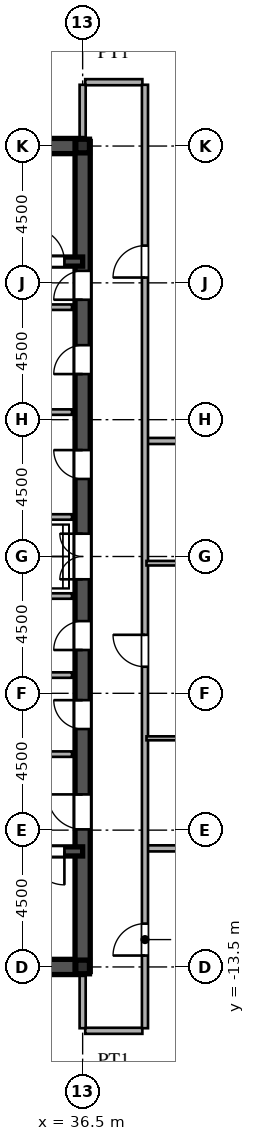
"""IFC4 building model, lengths in metres.
Left out: names, types, materials, properties, quantities, classifications, styles, units other than length and angle.
Written with IfcOpenShell. Run it as: python <this file> out.ifc"""

import sys

from ifc_helpers import new_model, si_unit, direction, frame, frame_2d, origin, origin_2d, place, context, subcontext, project, spatial, rectangle, i_section, extrude, source, transform, mapped, element, fill, save


model = new_model("IFC4")
c1 = context("Model", 3, precision=1e-05, world=origin(), true_north=direction((0.0, 1.0)))
c2 = subcontext(c1, "Body", "Model", "MODEL_VIEW")
j1 = project(units=[si_unit("LENGTHUNIT", "METRE"), si_unit("PLANEANGLEUNIT", "RADIAN")], contexts=[c1])
p1 = place(None, origin())
s1 = spatial("IfcSite", under=j1, at=p1, CompositionType="ELEMENT")
p2 = place(p1, origin())
s2 = spatial("IfcBuilding", under=s1, at=p2, CompositionType="ELEMENT")
p3 = place(p2, frame((0.0, 0.0, 258.15)))
s3 = spatial("IfcBuildingStorey", under=s2, at=p3, CompositionType="ELEMENT", Elevation=258.15)
m1 = source(origin(), c2, "Body", "SweptSolid", [
    extrude(i_section(OverallWidth=0.45, OverallDepth=0.45, WebThickness=0.016, FlangeThickness=0.025, at=origin_2d()), origin(), (0.0, 0.0, 1.0), 3.75),
])
for number, where, z_axis, x_axis in (
    (1, (36.5, -13.5, 0.0), (0.0, 0.0, 1.0), (1.0, 0.0, 0.0)),
    (2, (36.5, 13.5, 0.0), (0.0, 0.0, 1.0), (1.0, 0.0, 0.0)),
):
    element("IfcColumn", number, at=place(p3, frame(where, z_axis=z_axis, x_axis=x_axis)), inside=s3, PredefinedType="COLUMN", context=c2, shape_type="MappedRepresentation", body=[
        mapped(m1, transform((0.0, 0.0, 0.0), scale=1.0)),
    ])
for number, where, z_axis, x_axis in (
    (3, (27.5, -13.5, 0.0), (0.0, 0.0, 1.0), (1.0, 0.0, 0.0)),
    (4, (27.5, 13.5, 0.0), (0.0, 0.0, 1.0), (1.0, 0.0, 0.0)),
):
    element("IfcWall", number, at=place(p3, frame(where, z_axis=z_axis, x_axis=x_axis)), inside=s3, PredefinedType="SHEAR", context=c2, shape_type="SweptSolid", body=[
        extrude(rectangle(XDim=9.0, YDim=0.5, at=frame_2d((4.5, 0.0))), origin(), (0.0, 0.0, 1.0), 3.53),
    ])
p4 = place(p3, frame((36.5, -13.65, 0.0), z_axis=(0.0, 0.0, 1.0), x_axis=(0.0, 1.0, 0.0)))
e5 = element("IfcWall", 5, at=p4, inside=s3, PredefinedType="SHEAR", context=c2, shape_type="SweptSolid", body=[
    extrude(rectangle(XDim=7.15, YDim=0.5, at=frame_2d((3.575, 0.0))), origin(), (0.0, 0.0, 1.0), 3.53),
])
p5 = place(p4, frame((4.675, 0.0, 0.0)))
e6 = element("IfcOpeningElement", 6, at=p5, cuts=e5, PredefinedType="OPENING", context=c2, shape_type="SweptSolid", body=[
    extrude(rectangle(XDim=1.15, YDim=2.2, at=frame_2d((0.575, 1.1))), frame((0.0, 0.26, 0.0), z_axis=(0.0, -1.0, 0.0), x_axis=(1.0, 0.0, 0.0)), (0.0, 0.0, 1.0), 0.52),
])
p6 = place(p3, frame((36.5, -1.3, 0.0), z_axis=(0.0, 0.0, 1.0), x_axis=(0.0, 1.0, 0.0)))
e7 = element("IfcWall", 7, at=p6, inside=s3, PredefinedType="SHEAR", context=c2, shape_type="SweptSolid", body=[
    extrude(rectangle(XDim=2.6, YDim=0.5, at=frame_2d((1.3, 0.0))), origin(), (0.0, 0.0, 1.0), 3.53),
])
p7 = place(p6, frame((0.55, 0.0, 0.0)))
e8 = element("IfcOpeningElement", 8, at=p7, cuts=e7, PredefinedType="OPENING", context=c2, shape_type="SweptSolid", body=[
    extrude(rectangle(XDim=1.5, YDim=2.3, at=frame_2d((0.75, 1.15))), frame((0.0, 0.26, 0.0), z_axis=(0.0, -1.0, 0.0), x_axis=(1.0, 0.0, 0.0)), (0.0, 0.0, 1.0), 0.52),
])
p8 = place(p3, frame((36.5, 8.2, 0.0), z_axis=(0.0, 0.0, 1.0), x_axis=(0.0, 1.0, 0.0)))
e9 = element("IfcWall", 9, at=p8, inside=s3, PredefinedType="SHEAR", context=c2, shape_type="SweptSolid", body=[
    extrude(rectangle(XDim=5.45, YDim=0.5, at=frame_2d((2.725, 0.0))), origin(), (0.0, 0.0, 1.0), 3.53),
])
p9 = place(p8, frame((0.245, 0.0, 0.0)))
e10 = element("IfcOpeningElement", 10, at=p9, cuts=e9, PredefinedType="OPENING", context=c2, shape_type="SweptSolid", body=[
    extrude(rectangle(XDim=0.95, YDim=2.15, at=frame_2d((0.475, 1.075))), frame((0.0, 0.26, 0.0), z_axis=(0.0, -1.0, 0.0), x_axis=(1.0, 0.0, 0.0)), (0.0, 0.0, 1.0), 0.52),
])
p10 = place(p3, frame((36.5, -6.5, 0.0), z_axis=(0.0, 0.0, 1.0), x_axis=(0.0, 1.0, 0.0)))
e11 = element("IfcWall", 11, at=p10, inside=s3, PredefinedType="SHEAR", context=c2, shape_type="SweptSolid", body=[
    extrude(rectangle(XDim=2.6, YDim=0.5, at=frame_2d((1.3, 0.0))), origin(), (0.0, 0.0, 1.0), 3.53),
])
p11 = place(p10, frame((0.825, 0.0, 0.0)))
e12 = element("IfcOpeningElement", 12, at=p11, cuts=e11, PredefinedType="OPENING", context=c2, shape_type="SweptSolid", body=[
    extrude(rectangle(XDim=0.95, YDim=2.15, at=frame_2d((0.475, 1.075))), frame((0.0, 0.26, 0.0), z_axis=(0.0, -1.0, 0.0), x_axis=(1.0, 0.0, 0.0)), (0.0, 0.0, 1.0), 0.52),
])
p12 = place(p3, frame((36.5, -3.9, 0.0), z_axis=(0.0, 0.0, 1.0), x_axis=(0.0, 1.0, 0.0)))
e13 = element("IfcWall", 13, at=p12, inside=s3, PredefinedType="SHEAR", context=c2, shape_type="SweptSolid", body=[
    extrude(rectangle(XDim=2.6, YDim=0.5, at=frame_2d((1.3, 0.0))), origin(), (0.0, 0.0, 1.0), 3.53),
])
p13 = place(p12, frame((0.825, 0.0, 0.0)))
e14 = element("IfcOpeningElement", 14, at=p13, cuts=e13, PredefinedType="OPENING", context=c2, shape_type="SweptSolid", body=[
    extrude(rectangle(XDim=0.95, YDim=2.15, at=frame_2d((0.475, 1.075))), frame((0.0, 0.26, 0.0), z_axis=(0.0, -1.0, 0.0), x_axis=(1.0, 0.0, 0.0)), (0.0, 0.0, 1.0), 0.52),
])
p14 = place(p3, frame((36.5, 1.3, 0.0), z_axis=(0.0, 0.0, 1.0), x_axis=(0.0, 1.0, 0.0)))
e15 = element("IfcWall", 15, at=p14, inside=s3, PredefinedType="SHEAR", context=c2, shape_type="SweptSolid", body=[
    extrude(rectangle(XDim=3.45, YDim=0.5, at=frame_2d((1.725, 0.0))), origin(), (0.0, 0.0, 1.0), 3.53),
])
p15 = place(p14, frame((1.25, 0.0, 0.0)))
e16 = element("IfcOpeningElement", 16, at=p15, cuts=e15, PredefinedType="OPENING", context=c2, shape_type="SweptSolid", body=[
    extrude(rectangle(XDim=0.95, YDim=2.15, at=frame_2d((0.475, 1.075))), frame((0.0, 0.26, 0.0), z_axis=(0.0, -1.0, 0.0), x_axis=(1.0, 0.0, 0.0)), (0.0, 0.0, 1.0), 0.52),
])
p16 = place(p3, frame((36.5, 4.75, 0.0), z_axis=(0.0, 0.0, 1.0), x_axis=(0.0, 1.0, 0.0)))
e17 = element("IfcWall", 17, at=p16, inside=s3, PredefinedType="SHEAR", context=c2, shape_type="SweptSolid", body=[
    extrude(rectangle(XDim=3.45, YDim=0.5, at=frame_2d((1.725, 0.0))), origin(), (0.0, 0.0, 1.0), 3.53),
])
p17 = place(p16, frame((1.25, 0.0, 0.0)))
e18 = element("IfcOpeningElement", 18, at=p17, cuts=e17, PredefinedType="OPENING", context=c2, shape_type="SweptSolid", body=[
    extrude(rectangle(XDim=0.95, YDim=2.15, at=frame_2d((0.475, 1.075))), frame((0.0, 0.26, 0.0), z_axis=(0.0, -1.0, 0.0), x_axis=(1.0, 0.0, 0.0)), (0.0, 0.0, 1.0), 0.52),
])
p18 = place(p3, frame((27.5, -9.7, 0.0), z_axis=(0.0, 0.0, 1.0), x_axis=(1.0, 0.0, 0.0)))
e19 = element("IfcWall", 19, at=p18, inside=s3, PredefinedType="SHEAR", context=c2, shape_type="SweptSolid", body=[
    extrude(rectangle(XDim=9.0, YDim=0.3, at=frame_2d((4.5, 0.0))), origin(), (0.0, 0.0, 1.0), 3.53),
])
p19 = place(p18, frame((7.3, 0.0, 0.0)))
e20 = element("IfcOpeningElement", 20, at=p19, cuts=e19, PredefinedType="OPENING", context=c2, shape_type="SweptSolid", body=[
    extrude(rectangle(XDim=1.1, YDim=2.2, at=frame_2d((0.55, 1.1))), frame((0.0, 0.16, 0.0), z_axis=(0.0, -1.0, 0.0), x_axis=(1.0, 0.0, 0.0)), (0.0, 0.0, 1.0), 0.32),
])
p20 = place(p3, frame((27.5, 9.7, 0.0), z_axis=(0.0, 0.0, 1.0), x_axis=(1.0, 0.0, 0.0)))
e21 = element("IfcWall", 21, at=p20, inside=s3, PredefinedType="SHEAR", context=c2, shape_type="SweptSolid", body=[
    extrude(rectangle(XDim=9.0, YDim=0.3, at=frame_2d((4.5, 0.0))), origin(), (0.0, 0.0, 1.0), 3.53),
])
p21 = place(p20, frame((7.3, 0.0, 0.0)))
e22 = element("IfcOpeningElement", 22, at=p21, cuts=e21, PredefinedType="OPENING", context=c2, shape_type="SweptSolid", body=[
    extrude(rectangle(XDim=1.1, YDim=2.2, at=frame_2d((0.55, 1.1))), frame((0.0, 0.16, 0.0), z_axis=(0.0, -1.0, 0.0), x_axis=(1.0, 0.0, 0.0)), (0.0, 0.0, 1.0), 0.32),
])
for number, where, z_axis, x_axis in (
    (23, (30.45, -6.5, 0.0), (0.0, 0.0, 1.0), (1.0, 0.0, 0.0)),
    (24, (30.45, 8.2, 0.0), (0.0, 0.0, 1.0), (1.0, 0.0, 0.0)),
):
    element("IfcWall", number, at=place(p3, frame(where, z_axis=z_axis, x_axis=x_axis)), inside=s3, PredefinedType="PARTITIONING", context=c2, shape_type="SweptSolid", body=[
        extrude(rectangle(XDim=5.7, YDim=0.18, at=frame_2d((2.85, 0.0))), origin(), (0.0, 0.0, 1.0), 3.53),
    ])
for number, where, z_axis, x_axis in (
    (25, (33.2, -1.3, 0.0), (0.0, 0.0, 1.0), (1.0, 0.0, 0.0)),
    (26, (33.2, 1.3, 0.0), (0.0, 0.0, 1.0), (1.0, 0.0, 0.0)),
    (27, (33.2, -3.9, 0.0), (0.0, 0.0, 1.0), (1.0, 0.0, 0.0)),
    (28, (33.2, 4.75, 0.0), (0.0, 0.0, 1.0), (1.0, 0.0, 0.0)),
):
    element("IfcWall", number, at=place(p3, frame(where, z_axis=z_axis, x_axis=x_axis)), inside=s3, PredefinedType="PARTITIONING", context=c2, shape_type="SweptSolid", body=[
        extrude(rectangle(XDim=2.95, YDim=0.18, at=frame_2d((1.475, 0.0))), origin(), (0.0, 0.0, 1.0), 3.53),
    ])
p22 = place(p3, frame((36.585, -15.6, 0.0), z_axis=(0.0, 0.0, 1.0), x_axis=(1.0, 0.0, 0.0)))
e29 = element("IfcWall", 29, at=p22, inside=s3, PredefinedType="PARTITIONING", context=c2, shape_type="SweptSolid", body=[
    extrude(rectangle(XDim=1.88, YDim=0.2, at=frame_2d((0.94, 0.0))), origin(), (0.0, 0.0, 1.0), 3.53),
])
p23 = place(p3, frame((38.63, -9.6, 0.0), z_axis=(0.0, 0.0, 1.0), x_axis=(1.0, 0.0, 0.0)))
e30 = element("IfcWall", 30, at=p23, inside=s3, PredefinedType="PARTITIONING", context=c2, shape_type="SweptSolid", body=[
    extrude(rectangle(XDim=15.38, YDim=0.2, at=frame_2d((7.69, 0.0))), origin(), (0.0, 0.0, 1.0), 3.53),
])
p24 = place(p3, frame((38.6, -5.98, 0.0), z_axis=(0.0, 0.0, 1.0), x_axis=(1.0, 0.0, 0.0)))
e31 = element("IfcWall", 31, at=p24, inside=s3, PredefinedType="PARTITIONING", context=c2, shape_type="SweptSolid", body=[
    extrude(rectangle(XDim=4.8, YDim=0.13, at=frame_2d((2.4, 0.0))), origin(), (0.0, 0.0, 1.0), 3.53),
])
p25 = place(p24, frame((1.96, 0.0, 0.0)))
e32 = element("IfcOpeningElement", 32, at=p25, cuts=e31, PredefinedType="OPENING", context=c2, shape_type="SweptSolid", body=[
    extrude(rectangle(XDim=0.88, YDim=2.1, at=frame_2d((0.44, 1.05))), frame((0.0, 0.075, 0.0), z_axis=(0.0, -1.0, 0.0), x_axis=(1.0, 0.0, 0.0)), (0.0, 0.0, 1.0), 0.15),
])
p26 = place(p3, frame((38.6, -0.22, 0.0), z_axis=(0.0, 0.0, 1.0), x_axis=(1.0, 0.0, 0.0)))
e33 = element("IfcWall", 33, at=p26, inside=s3, PredefinedType="PARTITIONING", context=c2, shape_type="SweptSolid", body=[
    extrude(rectangle(XDim=4.8, YDim=0.15, at=frame_2d((2.4, 0.0))), origin(), (0.0, 0.0, 1.0), 3.53),
])
p27 = place(p26, frame((1.925, 0.0, 0.0)))
e34 = element("IfcOpeningElement", 34, at=p27, cuts=e33, PredefinedType="OPENING", context=c2, shape_type="SweptSolid", body=[
    extrude(rectangle(XDim=0.95, YDim=2.15, at=frame_2d((0.475, 1.075))), frame((0.0, 0.085, 0.0), z_axis=(0.0, -1.0, 0.0), x_axis=(1.0, 0.0, 0.0)), (0.0, 0.0, 1.0), 0.17),
])
p28 = place(p3, frame((38.63, 3.8, 0.0), z_axis=(0.0, 0.0, 1.0), x_axis=(1.0, 0.0, 0.0)))
e35 = element("IfcWall", 35, at=p28, inside=s3, PredefinedType="PARTITIONING", context=c2, shape_type="SweptSolid", body=[
    extrude(rectangle(XDim=25.046, YDim=0.2, at=frame_2d((12.523, 0.0))), origin(), (0.0, 0.0, 1.0), 3.53),
])
p29 = place(p3, frame((36.585, 15.6, 0.0), z_axis=(0.0, 0.0, 1.0), x_axis=(1.0, 0.0, 0.0)))
e36 = element("IfcWall", 36, at=p29, inside=s3, PredefinedType="PARTITIONING", context=c2, shape_type="SweptSolid", body=[
    extrude(rectangle(XDim=1.88, YDim=0.2, at=frame_2d((0.94, 0.0))), origin(), (0.0, 0.0, 1.0), 3.53),
])
for number, where, z_axis, x_axis in (
    (37, (36.5, -15.515, 0.0), (0.0, 0.0, 1.0), (0.0, 1.0, 0.0)),
    (38, (36.5, 13.755, 0.0), (0.0, 0.0, 1.0), (0.0, 1.0, 0.0)),
):
    element("IfcWall", number, at=place(p3, frame(where, z_axis=z_axis, x_axis=x_axis)), inside=s3, PredefinedType="PARTITIONING", context=c2, shape_type="SweptSolid", body=[
        extrude(rectangle(XDim=1.76, YDim=0.2, at=frame_2d((0.88, 0.0))), origin(), (0.0, 0.0, 1.0), 2.93),
    ])
p30 = place(p3, frame((38.55, -15.515, 0.0), z_axis=(0.0, 0.0, 1.0), x_axis=(0.0, 1.0, 0.0)))
e39 = element("IfcWall", 39, at=p30, inside=s3, PredefinedType="PARTITIONING", context=c2, shape_type="SweptSolid", body=[
    extrude(rectangle(XDim=31.03, YDim=0.2, at=frame_2d((15.515, 0.0))), origin(), (0.0, 0.0, 1.0), 3.53),
])
p31 = place(p30, frame((2.39, 0.0, 0.0)))
e40 = element("IfcOpeningElement", 40, at=p31, cuts=e39, PredefinedType="OPENING", context=c2, shape_type="SweptSolid", body=[
    extrude(rectangle(XDim=1.05, YDim=2.25, at=frame_2d((0.525, 1.125))), frame((0.0, 0.11, 0.0), z_axis=(0.0, -1.0, 0.0), x_axis=(1.0, 0.0, 0.0)), (0.0, 0.0, 1.0), 0.22),
])
p32 = place(p30, frame((11.889, 0.0, 0.0)))
e41 = element("IfcOpeningElement", 41, at=p32, cuts=e39, PredefinedType="OPENING", context=c2, shape_type="SweptSolid", body=[
    extrude(rectangle(XDim=1.05, YDim=2.25, at=frame_2d((0.525, 1.125))), frame((0.0, 0.11, 0.0), z_axis=(0.0, -1.0, 0.0), x_axis=(1.0, 0.0, 0.0)), (0.0, 0.0, 1.0), 0.22),
])
p33 = place(p30, frame((24.69, 0.0, 0.0)))
e42 = element("IfcOpeningElement", 42, at=p33, cuts=e39, PredefinedType="OPENING", context=c2, shape_type="SweptSolid", body=[
    extrude(rectangle(XDim=1.05, YDim=2.25, at=frame_2d((0.525, 1.125))), frame((0.0, 0.11, 0.0), z_axis=(0.0, -1.0, 0.0), x_axis=(1.0, 0.0, 0.0)), (0.0, 0.0, 1.0), 0.22),
])
m2 = source(origin(), c2, "Body", "SweptSolid", [
    extrude(rectangle(XDim=1.15, YDim=2.2, at=frame_2d((0.575, 1.1))), frame((0.0, 0.025, 0.0), z_axis=(0.0, -1.0, 0.0), x_axis=(1.0, 0.0, 0.0)), (0.0, 0.0, 1.0), 0.05),
])
p34 = place(p5, origin())
e43 = element("IfcDoor", 43, at=p34, inside=s3, OperationType="SINGLE_SWING_RIGHT", PredefinedType="DOOR", context=c2, shape_type="MappedRepresentation", body=[
    mapped(m2, transform((0.0, 0.0, 0.0), scale=1.0)),
])
fill(e6, e43)
m3 = source(origin(), c2, "Body", "SweptSolid", [
    extrude(rectangle(XDim=1.5, YDim=2.3, at=frame_2d((0.75, 1.15))), frame((0.0, 0.025, 0.0), z_axis=(0.0, -1.0, 0.0), x_axis=(1.0, 0.0, 0.0)), (0.0, 0.0, 1.0), 0.05),
])
p35 = place(p7, origin())
e44 = element("IfcDoor", 44, at=p35, inside=s3, OperationType="DOUBLE_SWING_LEFT", PredefinedType="DOOR", context=c2, shape_type="MappedRepresentation", body=[
    mapped(m3, transform((0.0, 0.0, 0.0), scale=1.0)),
])
fill(e8, e44)
m4 = source(origin(), c2, "Body", "SweptSolid", [
    extrude(rectangle(XDim=0.95, YDim=2.15, at=frame_2d((0.475, 1.075))), frame((0.0, 0.025, 0.0), z_axis=(0.0, -1.0, 0.0), x_axis=(1.0, 0.0, 0.0)), (0.0, 0.0, 1.0), 0.05),
])
p36 = place(p9, origin())
e45 = element("IfcDoor", 45, at=p36, inside=s3, OperationType="SINGLE_SWING_LEFT", PredefinedType="DOOR", context=c2, shape_type="MappedRepresentation", body=[
    mapped(m4, transform((0.0, 0.0, 0.0), scale=1.0)),
])
fill(e10, e45)
p37 = place(p11, origin())
e46 = element("IfcDoor", 46, at=p37, inside=s3, OperationType="SINGLE_SWING_RIGHT", PredefinedType="DOOR", context=c2, shape_type="MappedRepresentation", body=[
    mapped(m4, transform((0.0, 0.0, 0.0), scale=1.0)),
])
fill(e12, e46)
p38 = place(p13, origin())
e47 = element("IfcDoor", 47, at=p38, inside=s3, OperationType="SINGLE_SWING_LEFT", PredefinedType="DOOR", context=c2, shape_type="MappedRepresentation", body=[
    mapped(m4, transform((0.0, 0.0, 0.0), scale=1.0)),
])
fill(e14, e47)
p39 = place(p15, origin())
e48 = element("IfcDoor", 48, at=p39, inside=s3, OperationType="SINGLE_SWING_RIGHT", PredefinedType="DOOR", context=c2, shape_type="MappedRepresentation", body=[
    mapped(m4, transform((0.0, 0.0, 0.0), scale=1.0)),
])
fill(e16, e48)
p40 = place(p17, origin())
e49 = element("IfcDoor", 49, at=p40, inside=s3, OperationType="SINGLE_SWING_LEFT", PredefinedType="DOOR", context=c2, shape_type="MappedRepresentation", body=[
    mapped(m4, transform((0.0, 0.0, 0.0), scale=1.0)),
])
fill(e18, e49)
m5 = source(origin(), c2, "Body", "SweptSolid", [
    extrude(rectangle(XDim=1.1, YDim=2.2, at=frame_2d((0.55, 1.1))), frame((0.0, 0.025, 0.0), z_axis=(0.0, -1.0, 0.0), x_axis=(1.0, 0.0, 0.0)), (0.0, 0.0, 1.0), 0.05),
])
p41 = place(p19, frame((1.1, 0.0, 0.0), z_axis=(0.0, 0.0, 1.0), x_axis=(-1.0, 0.0, 0.0)))
e50 = element("IfcDoor", 50, at=p41, inside=s3, OperationType="SINGLE_SWING_RIGHT", PredefinedType="DOOR", context=c2, shape_type="MappedRepresentation", body=[
    mapped(m5, transform((0.0, 0.0, 0.0), scale=1.0)),
])
fill(e20, e50)
p42 = place(p21, origin())
e51 = element("IfcDoor", 51, at=p42, inside=s3, OperationType="SINGLE_SWING_LEFT", PredefinedType="DOOR", context=c2, shape_type="MappedRepresentation", body=[
    mapped(m5, transform((0.0, 0.0, 0.0), scale=1.0)),
])
fill(e22, e51)
m6 = source(origin(), c2, "Body", "SweptSolid", [
    extrude(rectangle(XDim=1.05, YDim=2.25, at=frame_2d((0.525, 1.125))), frame((0.0, 0.025, 0.0), z_axis=(0.0, -1.0, 0.0), x_axis=(1.0, 0.0, 0.0)), (0.0, 0.0, 1.0), 0.05),
])
p43 = place(p31, origin())
e52 = element("IfcDoor", 52, at=p43, inside=s3, OperationType="SINGLE_SWING_LEFT", PredefinedType="DOOR", context=c2, shape_type="MappedRepresentation", body=[
    mapped(m6, transform((0.0, 0.0, 0.0), scale=1.0)),
])
fill(e40, e52)
p44 = place(p32, origin())
e53 = element("IfcDoor", 53, at=p44, inside=s3, OperationType="SINGLE_SWING_RIGHT", PredefinedType="DOOR", context=c2, shape_type="MappedRepresentation", body=[
    mapped(m6, transform((0.0, 0.0, 0.0), scale=1.0)),
])
fill(e41, e53)
p45 = place(p33, origin())
e54 = element("IfcDoor", 54, at=p45, inside=s3, OperationType="SINGLE_SWING_LEFT", PredefinedType="DOOR", context=c2, shape_type="MappedRepresentation", body=[
    mapped(m6, transform((0.0, 0.0, 0.0), scale=1.0)),
])
fill(e42, e54)
save(model, sys.argv[1])
